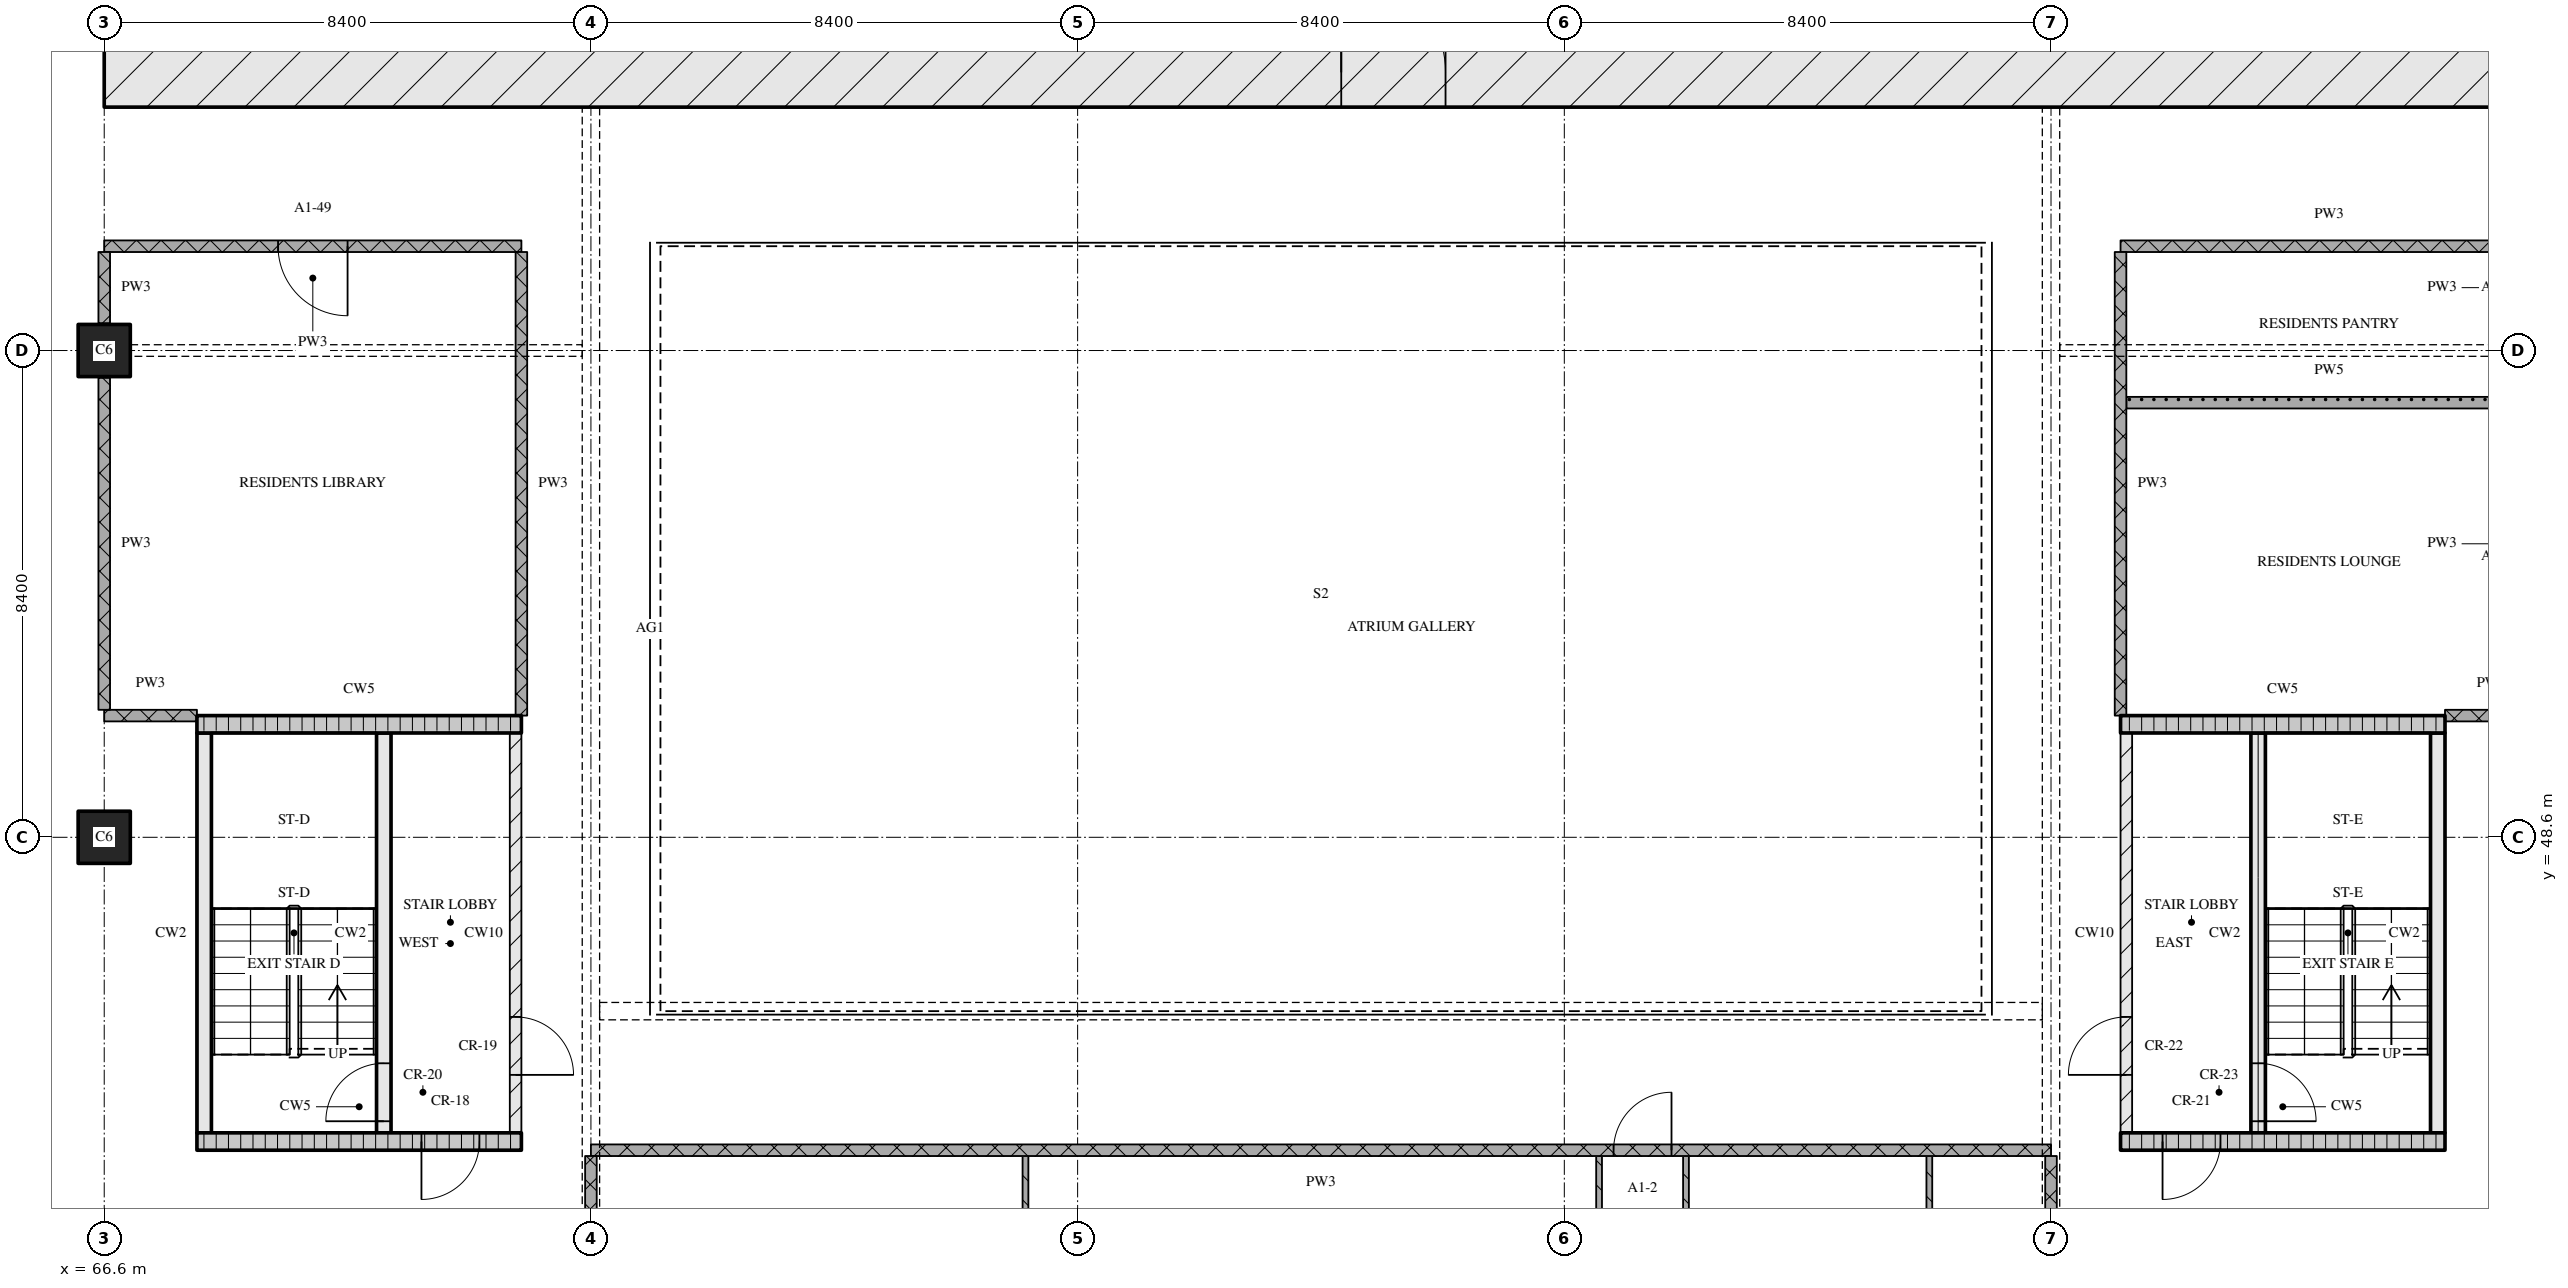
"""IFC4 building model, lengths in metres.
Left out: names, types, materials, properties, quantities, classifications, styles, units other than length and angle.
Written with IfcOpenShell. Run it as: python <this file> out.ifc"""

import sys

from ifc_helpers import new_model, si_unit, direction, frame, frame_2d, origin, origin_2d, place, context, subcontext, project, spatial, rectangle, extrude, element, fill, save


model = new_model("IFC4")
c1 = context("Model", 3, precision=1e-05, world=origin(), true_north=direction((0.0, 1.0)))
c2 = subcontext(c1, "Body", "Model", "MODEL_VIEW")
j1 = project(units=[si_unit("LENGTHUNIT", "METRE"), si_unit("PLANEANGLEUNIT", "RADIAN")], contexts=[c1])
p1 = place(None, origin())
s1 = spatial("IfcSite", under=j1, at=p1, CompositionType="ELEMENT")
p2 = place(p1, origin())
s2 = spatial("IfcBuilding", under=s1, at=p2, CompositionType="ELEMENT")
p3 = place(p2, frame((0.0, 0.0, 37.2)))
s3 = spatial("IfcBuildingStorey", under=s2, at=p3, CompositionType="ELEMENT", Elevation=37.2)
for number, where, z_axis, x_axis in (
    (1, (66.6, 48.6, 0.0), (0.0, 0.0, 1.0), (1.0, 0.0, 0.0)),
    (2, (66.6, 57.0, 0.0), (0.0, 0.0, 1.0), (1.0, 0.0, 0.0)),
):
    element("IfcColumn", number, at=place(p3, frame(where, z_axis=z_axis, x_axis=x_axis)), inside=s3, PredefinedType="COLUMN", context=c2, shape_type="SweptSolid", body=[
        extrude(rectangle(XDim=0.9, YDim=0.9, at=origin_2d()), origin(), (0.0, 0.0, 1.0), 3.6),
    ])
p4 = place(p3, frame((66.6, 61.8, 0.0), z_axis=(0.0, 0.0, 1.0), x_axis=(1.0, 0.0, 0.0)))
e3 = element("IfcWall", 3, at=p4, inside=s3, PredefinedType="SOLIDWALL", context=c2, shape_type="SweptSolid", body=[
    extrude(rectangle(XDim=42.0, YDim=1.2, at=frame_2d((21.0, 0.0))), origin(), (0.0, 0.0, 1.0), 3.32),
])
p5 = place(p4, frame((21.35, 0.0, 0.0)))
e4 = element("IfcOpeningElement", 4, at=p5, cuts=e3, PredefinedType="OPENING", context=c2, shape_type="SweptSolid", body=[
    extrude(rectangle(XDim=1.8, YDim=2.1, at=frame_2d((0.9, 1.05))), frame((0.0, 0.61, 0.0), z_axis=(0.0, -1.0, 0.0), x_axis=(1.0, 0.0, 0.0)), (0.0, 0.0, 1.0), 1.22),
])
p6 = place(p3, frame((68.2, 43.35, 0.0), z_axis=(0.0, 0.0, 1.0), x_axis=(1.0, 0.0, 0.0)))
e5 = element("IfcWall", 5, at=p6, inside=s3, PredefinedType="SOLIDWALL", context=c2, shape_type="SweptSolid", body=[
    extrude(rectangle(XDim=5.6, YDim=0.3, at=frame_2d((2.8, 0.0))), origin(), (0.0, 0.0, 1.0), 3.32),
])
p7 = place(p6, frame((3.875, 0.0, 0.0)))
e6 = element("IfcOpeningElement", 6, at=p7, cuts=e5, PredefinedType="OPENING", context=c2, shape_type="SweptSolid", body=[
    extrude(rectangle(XDim=1.0, YDim=2.1, at=frame_2d((0.5, 1.05))), frame((0.0, 0.16, 0.0), z_axis=(0.0, -1.0, 0.0), x_axis=(1.0, 0.0, 0.0)), (0.0, 0.0, 1.0), 0.32),
])
p8 = place(p3, frame((68.325, 43.5, 0.0), z_axis=(0.0, 0.0, 1.0), x_axis=(0.0, 1.0, 0.0)))
e7 = element("IfcWall", 7, at=p8, inside=s3, PredefinedType="SOLIDWALL", context=c2, shape_type="SweptSolid", body=[
    extrude(rectangle(XDim=6.9, YDim=0.25, at=frame_2d((3.45, 0.0))), origin(), (0.0, 0.0, 1.0), 3.32),
])
p9 = place(p3, frame((71.425, 43.5, 0.0), z_axis=(0.0, 0.0, 1.0), x_axis=(0.0, 1.0, 0.0)))
e8 = element("IfcWall", 8, at=p9, inside=s3, PredefinedType="SOLIDWALL", context=c2, shape_type="SweptSolid", body=[
    extrude(rectangle(XDim=6.9, YDim=0.25, at=frame_2d((3.45, 0.0))), origin(), (0.0, 0.0, 1.0), 3.32),
])
p10 = place(p9, frame((0.2, 0.0, 0.0)))
e9 = element("IfcOpeningElement", 9, at=p10, cuts=e8, PredefinedType="OPENING", context=c2, shape_type="SweptSolid", body=[
    extrude(rectangle(XDim=1.0, YDim=2.1, at=frame_2d((0.5, 1.05))), frame((0.0, 0.135, 0.0), z_axis=(0.0, -1.0, 0.0), x_axis=(1.0, 0.0, 0.0)), (0.0, 0.0, 1.0), 0.27),
])
p11 = place(p3, frame((73.7, 43.5, 0.0), z_axis=(0.0, 0.0, 1.0), x_axis=(0.0, 1.0, 0.0)))
e10 = element("IfcWall", 10, at=p11, inside=s3, PredefinedType="PARTITIONING", context=c2, shape_type="SweptSolid", body=[
    extrude(rectangle(XDim=6.9, YDim=0.2, at=frame_2d((3.45, 0.0))), origin(), (0.0, 0.0, 1.0), 3.32),
])
p12 = place(p11, frame((1.0, 0.0, 0.0)))
e11 = element("IfcOpeningElement", 11, at=p12, cuts=e10, PredefinedType="OPENING", context=c2, shape_type="SweptSolid", body=[
    extrude(rectangle(XDim=1.0, YDim=2.1, at=frame_2d((0.5, 1.05))), frame((0.0, 0.11, 0.0), z_axis=(0.0, -1.0, 0.0), x_axis=(1.0, 0.0, 0.0)), (0.0, 0.0, 1.0), 0.22),
])
p13 = place(p3, frame((68.2, 50.55, 0.0), z_axis=(0.0, 0.0, 1.0), x_axis=(1.0, 0.0, 0.0)))
e12 = element("IfcWall", 12, at=p13, inside=s3, PredefinedType="SOLIDWALL", context=c2, shape_type="SweptSolid", body=[
    extrude(rectangle(XDim=5.6, YDim=0.3, at=frame_2d((2.8, 0.0))), origin(), (0.0, 0.0, 1.0), 3.32),
])
p14 = place(p3, frame((101.4, 43.35, 0.0), z_axis=(0.0, 0.0, 1.0), x_axis=(1.0, 0.0, 0.0)))
e13 = element("IfcWall", 13, at=p14, inside=s3, PredefinedType="SOLIDWALL", context=c2, shape_type="SweptSolid", body=[
    extrude(rectangle(XDim=5.6, YDim=0.3, at=frame_2d((2.8, 0.0))), origin(), (0.0, 0.0, 1.0), 3.32),
])
p15 = place(p14, frame((0.725, 0.0, 0.0)))
e14 = element("IfcOpeningElement", 14, at=p15, cuts=e13, PredefinedType="OPENING", context=c2, shape_type="SweptSolid", body=[
    extrude(rectangle(XDim=1.0, YDim=2.1, at=frame_2d((0.5, 1.05))), frame((0.0, 0.16, 0.0), z_axis=(0.0, -1.0, 0.0), x_axis=(1.0, 0.0, 0.0)), (0.0, 0.0, 1.0), 0.32),
])
p16 = place(p3, frame((101.5, 43.5, 0.0), z_axis=(0.0, 0.0, 1.0), x_axis=(0.0, 1.0, 0.0)))
e15 = element("IfcWall", 15, at=p16, inside=s3, PredefinedType="PARTITIONING", context=c2, shape_type="SweptSolid", body=[
    extrude(rectangle(XDim=6.9, YDim=0.2, at=frame_2d((3.45, 0.0))), origin(), (0.0, 0.0, 1.0), 3.32),
])
p17 = place(p16, frame((1.0, 0.0, 0.0)))
e16 = element("IfcOpeningElement", 16, at=p17, cuts=e15, PredefinedType="OPENING", context=c2, shape_type="SweptSolid", body=[
    extrude(rectangle(XDim=1.0, YDim=2.1, at=frame_2d((0.5, 1.05))), frame((0.0, 0.11, 0.0), z_axis=(0.0, -1.0, 0.0), x_axis=(1.0, 0.0, 0.0)), (0.0, 0.0, 1.0), 0.22),
])
p18 = place(p3, frame((103.775, 43.5, 0.0), z_axis=(0.0, 0.0, 1.0), x_axis=(0.0, 1.0, 0.0)))
e17 = element("IfcWall", 17, at=p18, inside=s3, PredefinedType="SOLIDWALL", context=c2, shape_type="SweptSolid", body=[
    extrude(rectangle(XDim=6.9, YDim=0.25, at=frame_2d((3.45, 0.0))), origin(), (0.0, 0.0, 1.0), 3.32),
])
p19 = place(p18, frame((0.2, 0.0, 0.0)))
e18 = element("IfcOpeningElement", 18, at=p19, cuts=e17, PredefinedType="OPENING", context=c2, shape_type="SweptSolid", body=[
    extrude(rectangle(XDim=1.0, YDim=2.1, at=frame_2d((0.5, 1.05))), frame((0.0, 0.135, 0.0), z_axis=(0.0, -1.0, 0.0), x_axis=(1.0, 0.0, 0.0)), (0.0, 0.0, 1.0), 0.27),
])
p20 = place(p3, frame((106.875, 43.5, 0.0), z_axis=(0.0, 0.0, 1.0), x_axis=(0.0, 1.0, 0.0)))
e19 = element("IfcWall", 19, at=p20, inside=s3, PredefinedType="SOLIDWALL", context=c2, shape_type="SweptSolid", body=[
    extrude(rectangle(XDim=6.9, YDim=0.25, at=frame_2d((3.45, 0.0))), origin(), (0.0, 0.0, 1.0), 3.32),
])
p21 = place(p3, frame((101.4, 50.55, 0.0), z_axis=(0.0, 0.0, 1.0), x_axis=(1.0, 0.0, 0.0)))
e20 = element("IfcWall", 20, at=p21, inside=s3, PredefinedType="SOLIDWALL", context=c2, shape_type="SweptSolid", body=[
    extrude(rectangle(XDim=5.6, YDim=0.3, at=frame_2d((2.8, 0.0))), origin(), (0.0, 0.0, 1.0), 3.32),
])
p22 = place(p3, frame((100.2, 43.2, 0.0), z_axis=(0.0, 0.0, 1.0), x_axis=(-1.0, 0.0, 0.0)))
e21 = element("IfcWall", 21, at=p22, inside=s3, PredefinedType="PARTITIONING", context=c2, shape_type="SweptSolid", body=[
    extrude(rectangle(XDim=25.2, YDim=0.2, at=frame_2d((12.6, 0.0))), origin(), (0.0, 0.0, 1.0), 3.32),
])
p23 = place(p22, frame((6.55, 0.0, 0.0)))
e22 = element("IfcOpeningElement", 22, at=p23, cuts=e21, PredefinedType="OPENING", context=c2, shape_type="SweptSolid", body=[
    extrude(rectangle(XDim=1.0, YDim=2.1, at=frame_2d((0.5, 1.05))), frame((0.0, 0.11, 0.0), z_axis=(0.0, -1.0, 0.0), x_axis=(1.0, 0.0, 0.0)), (0.0, 0.0, 1.0), 0.22),
])
p24 = place(p3, frame((66.6, 50.7, 0.0), z_axis=(0.0, 0.0, 1.0), x_axis=(1.0, 0.0, 0.0)))
e23 = element("IfcWall", 23, at=p24, inside=s3, PredefinedType="PARTITIONING", context=c2, shape_type="SweptSolid", body=[
    extrude(rectangle(XDim=1.6, YDim=0.2, at=frame_2d((0.8, 0.0))), origin(), (0.0, 0.0, 1.0), 3.32),
])
p25 = place(p3, frame((107.0, 50.7, 0.0), z_axis=(0.0, 0.0, 1.0), x_axis=(1.0, 0.0, 0.0)))
e24 = element("IfcWall", 24, at=p25, inside=s3, PredefinedType="PARTITIONING", context=c2, shape_type="SweptSolid", body=[
    extrude(rectangle(XDim=1.6, YDim=0.2, at=frame_2d((0.8, 0.0))), origin(), (0.0, 0.0, 1.0), 3.32),
])
p26 = place(p3, frame((101.5, 56.1, 0.0), z_axis=(0.0, 0.0, 1.0), x_axis=(1.0, 0.0, 0.0)))
e25 = element("IfcWall", 25, at=p26, inside=s3, PredefinedType="PARTITIONING", context=c2, shape_type="SweptSolid", body=[
    extrude(rectangle(XDim=7.0, YDim=0.2, at=frame_2d((3.5, 0.0))), origin(), (0.0, 0.0, 1.0), 3.32),
])
p27 = place(p3, frame((73.8, 58.8, 0.0), z_axis=(0.0, 0.0, 1.0), x_axis=(-1.0, 0.0, 0.0)))
e26 = element("IfcWall", 26, at=p27, inside=s3, PredefinedType="PARTITIONING", context=c2, shape_type="SweptSolid", body=[
    extrude(rectangle(XDim=7.2, YDim=0.2, at=frame_2d((3.6, 0.0))), origin(), (0.0, 0.0, 1.0), 3.32),
])
p28 = place(p27, frame((3.0, 0.0, 0.0)))
e27 = element("IfcOpeningElement", 27, at=p28, cuts=e26, PredefinedType="OPENING", context=c2, shape_type="SweptSolid", body=[
    extrude(rectangle(XDim=1.2, YDim=2.1, at=frame_2d((0.6, 1.05))), frame((0.0, 0.11, 0.0), z_axis=(0.0, -1.0, 0.0), x_axis=(1.0, 0.0, 0.0)), (0.0, 0.0, 1.0), 0.22),
])
p29 = place(p3, frame((101.4, 58.8, 0.0), z_axis=(0.0, 0.0, 1.0), x_axis=(1.0, 0.0, 0.0)))
e28 = element("IfcWall", 28, at=p29, inside=s3, PredefinedType="PARTITIONING", context=c2, shape_type="SweptSolid", body=[
    extrude(rectangle(XDim=7.2, YDim=0.2, at=frame_2d((3.6, 0.0))), origin(), (0.0, 0.0, 1.0), 3.32),
])
p30 = place(p3, frame((66.6, 56.53, 0.0), z_axis=(0.0, 0.0, 1.0), x_axis=(0.0, -1.0, 0.0)))
e29 = element("IfcWall", 29, at=p30, inside=s3, PredefinedType="PARTITIONING", context=c2, shape_type="SweptSolid", body=[
    extrude(rectangle(XDim=5.73, YDim=0.2, at=frame_2d((2.865, 0.0))), origin(), (0.0, 0.0, 1.0), 3.32),
])
p31 = place(p3, frame((66.6, 58.7, 0.0), z_axis=(0.0, 0.0, 1.0), x_axis=(0.0, -1.0, 0.0)))
e30 = element("IfcWall", 30, at=p31, inside=s3, PredefinedType="PARTITIONING", context=c2, shape_type="SweptSolid", body=[
    extrude(rectangle(XDim=1.23, YDim=0.2, at=frame_2d((0.615, 0.0))), origin(), (0.0, 0.0, 1.0), 3.32),
])
p32 = place(p3, frame((73.8, 58.7, 0.0), z_axis=(0.0, 0.0, 1.0), x_axis=(0.0, -1.0, 0.0)))
e31 = element("IfcWall", 31, at=p32, inside=s3, PredefinedType="PARTITIONING", context=c2, shape_type="SweptSolid", body=[
    extrude(rectangle(XDim=8.0, YDim=0.2, at=frame_2d((4.0, 0.0))), origin(), (0.0, 0.0, 1.0), 3.32),
])
p33 = place(p3, frame((75.0, 43.1, 0.0), z_axis=(0.0, 0.0, 1.0), x_axis=(0.0, -1.0, 0.0)))
e32 = element("IfcWall", 32, at=p33, inside=s3, PredefinedType="PARTITIONING", context=c2, shape_type="SweptSolid", body=[
    extrude(rectangle(XDim=2.2, YDim=0.2, at=frame_2d((1.1, 0.0))), origin(), (0.0, 0.0, 1.0), 2.43),
])
p34 = place(p3, frame((82.5, 43.1, 0.0), z_axis=(0.0, 0.0, 1.0), x_axis=(0.0, -1.0, 0.0)))
e33 = element("IfcWall", 33, at=p34, inside=s3, PredefinedType="PARTITIONING", context=c2, shape_type="SweptSolid", body=[
    extrude(rectangle(XDim=4.35, YDim=0.1, at=frame_2d((2.175, 0.0))), origin(), (0.0, 0.0, 1.0), 3.32),
])
p35 = place(p3, frame((92.4, 38.75, 0.0), z_axis=(0.0, 0.0, 1.0), x_axis=(0.0, 1.0, 0.0)))
e34 = element("IfcWall", 34, at=p35, inside=s3, PredefinedType="PARTITIONING", context=c2, shape_type="SweptSolid", body=[
    extrude(rectangle(XDim=4.35, YDim=0.1, at=frame_2d((2.175, 0.0))), origin(), (0.0, 0.0, 1.0), 3.32),
])
p36 = place(p35, frame((2.05, 0.0, 0.0)))
e35 = element("IfcOpeningElement", 35, at=p36, cuts=e34, PredefinedType="OPENING", context=c2, shape_type="SweptSolid", body=[
    extrude(rectangle(XDim=0.9, YDim=2.1, at=frame_2d((0.45, 1.05))), frame((0.0, 0.06, 0.0), z_axis=(0.0, -1.0, 0.0), x_axis=(1.0, 0.0, 0.0)), (0.0, 0.0, 1.0), 0.12),
])
p37 = place(p3, frame((93.9, 43.1, 0.0), z_axis=(0.0, 0.0, 1.0), x_axis=(0.0, -1.0, 0.0)))
e36 = element("IfcWall", 36, at=p37, inside=s3, PredefinedType="PARTITIONING", context=c2, shape_type="SweptSolid", body=[
    extrude(rectangle(XDim=4.35, YDim=0.1, at=frame_2d((2.175, 0.0))), origin(), (0.0, 0.0, 1.0), 3.32),
])
p38 = place(p37, frame((1.75, 0.0, 0.0)))
e37 = element("IfcOpeningElement", 37, at=p38, cuts=e36, PredefinedType="OPENING", context=c2, shape_type="SweptSolid", body=[
    extrude(rectangle(XDim=0.8, YDim=2.1, at=frame_2d((0.4, 1.05))), frame((0.0, 0.06, 0.0), z_axis=(0.0, -1.0, 0.0), x_axis=(1.0, 0.0, 0.0)), (0.0, 0.0, 1.0), 0.12),
])
p39 = place(p3, frame((98.1, 43.1, 0.0), z_axis=(0.0, 0.0, 1.0), x_axis=(0.0, -1.0, 0.0)))
e38 = element("IfcWall", 38, at=p39, inside=s3, PredefinedType="PARTITIONING", context=c2, shape_type="SweptSolid", body=[
    extrude(rectangle(XDim=4.35, YDim=0.1, at=frame_2d((2.175, 0.0))), origin(), (0.0, 0.0, 1.0), 3.32),
])
p40 = place(p3, frame((100.2, 43.1, 0.0), z_axis=(0.0, 0.0, 1.0), x_axis=(0.0, -1.0, 0.0)))
e39 = element("IfcWall", 39, at=p40, inside=s3, PredefinedType="PARTITIONING", context=c2, shape_type="SweptSolid", body=[
    extrude(rectangle(XDim=2.2, YDim=0.2, at=frame_2d((1.1, 0.0))), origin(), (0.0, 0.0, 1.0), 2.43),
])
p41 = place(p3, frame((101.4, 58.7, 0.0), z_axis=(0.0, 0.0, 1.0), x_axis=(0.0, -1.0, 0.0)))
e40 = element("IfcWall", 40, at=p41, inside=s3, PredefinedType="PARTITIONING", context=c2, shape_type="SweptSolid", body=[
    extrude(rectangle(XDim=8.0, YDim=0.2, at=frame_2d((4.0, 0.0))), origin(), (0.0, 0.0, 1.0), 3.32),
])
p42 = place(p5, origin())
e41 = element("IfcDoor", 41, at=p42, inside=s3, OperationType="DOUBLE_DOOR_SINGLE_SWING", PredefinedType="DOOR", context=c2, shape_type="SweptSolid", body=[
    extrude(rectangle(XDim=1.8, YDim=2.1, at=frame_2d((0.9, 1.05))), frame((0.0, 0.025, 0.0), z_axis=(0.0, -1.0, 0.0), x_axis=(1.0, 0.0, 0.0)), (0.0, 0.0, 1.0), 0.05),
])
fill(e4, e41)
p43 = place(p7, origin())
e42 = element("IfcDoor", 42, at=p43, inside=s3, OperationType="SINGLE_SWING_RIGHT", PredefinedType="DOOR", context=c2, shape_type="SweptSolid", body=[
    extrude(rectangle(XDim=1.0, YDim=2.1, at=frame_2d((0.5, 1.05))), frame((0.0, 0.025, 0.0), z_axis=(0.0, -1.0, 0.0), x_axis=(1.0, 0.0, 0.0)), (0.0, 0.0, 1.0), 0.05),
])
fill(e6, e42)
p44 = place(p10, origin())
e43 = element("IfcDoor", 43, at=p44, inside=s3, OperationType="SINGLE_SWING_LEFT", PredefinedType="DOOR", context=c2, shape_type="SweptSolid", body=[
    extrude(rectangle(XDim=1.0, YDim=2.1, at=frame_2d((0.5, 1.05))), frame((0.0, 0.025, 0.0), z_axis=(0.0, -1.0, 0.0), x_axis=(1.0, 0.0, 0.0)), (0.0, 0.0, 1.0), 0.05),
])
fill(e9, e43)
p45 = place(p12, origin())
e44 = element("IfcDoor", 44, at=p45, inside=s3, OperationType="SINGLE_SWING_RIGHT", PredefinedType="DOOR", context=c2, shape_type="SweptSolid", body=[
    extrude(rectangle(XDim=1.0, YDim=2.1, at=frame_2d((0.5, 1.05))), frame((0.0, 0.025, 0.0), z_axis=(0.0, -1.0, 0.0), x_axis=(1.0, 0.0, 0.0)), (0.0, 0.0, 1.0), 0.05),
])
fill(e11, e44)
p46 = place(p15, origin())
e45 = element("IfcDoor", 45, at=p46, inside=s3, OperationType="SINGLE_SWING_RIGHT", PredefinedType="DOOR", context=c2, shape_type="SweptSolid", body=[
    extrude(rectangle(XDim=1.0, YDim=2.1, at=frame_2d((0.5, 1.05))), frame((0.0, 0.025, 0.0), z_axis=(0.0, -1.0, 0.0), x_axis=(1.0, 0.0, 0.0)), (0.0, 0.0, 1.0), 0.05),
])
fill(e14, e45)
p47 = place(p19, origin())
e46 = element("IfcDoor", 46, at=p47, inside=s3, OperationType="SINGLE_SWING_RIGHT", PredefinedType="DOOR", context=c2, shape_type="SweptSolid", body=[
    extrude(rectangle(XDim=1.0, YDim=2.1, at=frame_2d((0.5, 1.05))), frame((0.0, 0.025, 0.0), z_axis=(0.0, -1.0, 0.0), x_axis=(1.0, 0.0, 0.0)), (0.0, 0.0, 1.0), 0.05),
])
fill(e18, e46)
p48 = place(p17, origin())
e47 = element("IfcDoor", 47, at=p48, inside=s3, OperationType="SINGLE_SWING_LEFT", PredefinedType="DOOR", context=c2, shape_type="SweptSolid", body=[
    extrude(rectangle(XDim=1.0, YDim=2.1, at=frame_2d((0.5, 1.05))), frame((0.0, 0.025, 0.0), z_axis=(0.0, -1.0, 0.0), x_axis=(1.0, 0.0, 0.0)), (0.0, 0.0, 1.0), 0.05),
])
fill(e16, e47)
p49 = place(p23, origin())
e48 = element("IfcDoor", 48, at=p49, inside=s3, OperationType="SINGLE_SWING_RIGHT", PredefinedType="DOOR", context=c2, shape_type="SweptSolid", body=[
    extrude(rectangle(XDim=1.0, YDim=2.1, at=frame_2d((0.5, 1.05))), frame((0.0, 0.025, 0.0), z_axis=(0.0, -1.0, 0.0), x_axis=(1.0, 0.0, 0.0)), (0.0, 0.0, 1.0), 0.05),
])
fill(e22, e48)
p50 = place(p28, origin())
e49 = element("IfcDoor", 49, at=p50, inside=s3, OperationType="SINGLE_SWING_LEFT", PredefinedType="DOOR", context=c2, shape_type="SweptSolid", body=[
    extrude(rectangle(XDim=1.2, YDim=2.1, at=frame_2d((0.6, 1.05))), frame((0.0, 0.025, 0.0), z_axis=(0.0, -1.0, 0.0), x_axis=(1.0, 0.0, 0.0)), (0.0, 0.0, 1.0), 0.05),
])
fill(e27, e49)
save(model, sys.argv[1])
